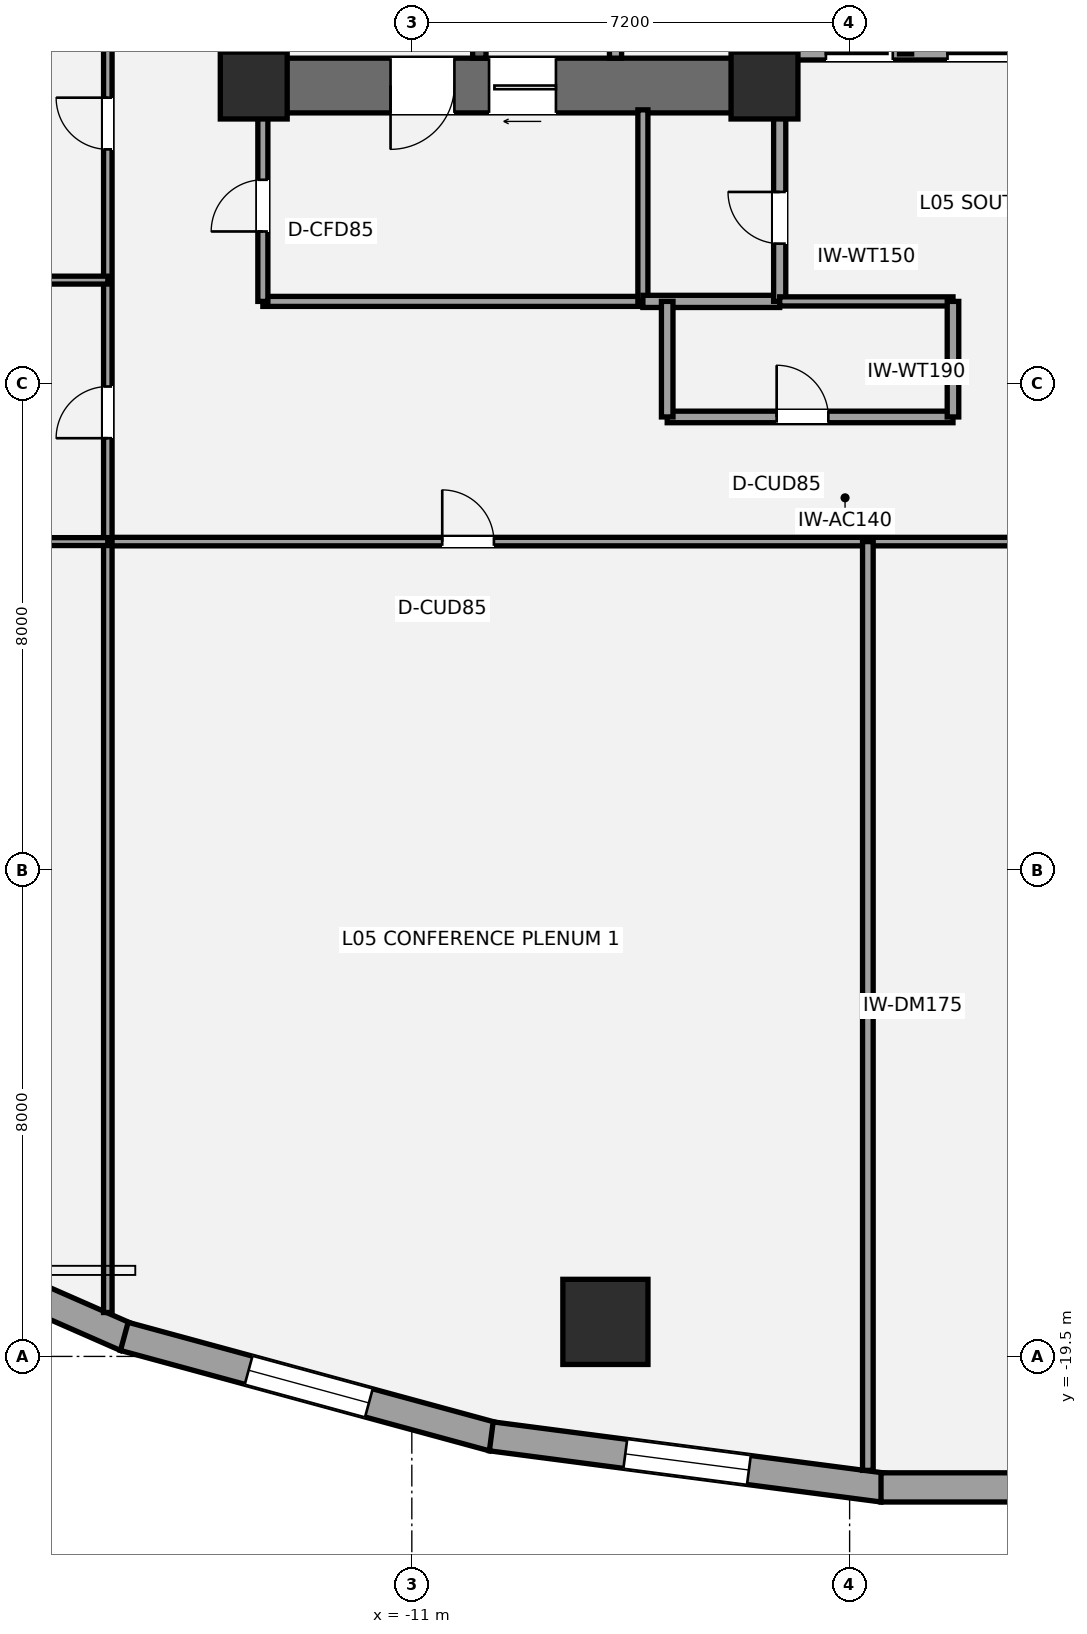
"""IFC4 building model, lengths in metres.
Left out: names, types, materials, properties, quantities, classifications, styles, units other than length and angle.
Written with IfcOpenShell. Run it as: python <this file> out.ifc"""

import sys

from ifc_helpers import new_model, si_unit, direction, frame, frame_2d, origin, origin_2d, place, context, subcontext, project, spatial, rectangle, hollow_circle, extrude, element, fill, save


model = new_model("IFC4")
c1 = context("Model", 3, precision=1e-05, world=origin(), true_north=direction((0.0, 1.0)))
c2 = subcontext(c1, "Body", "Model", "MODEL_VIEW")
j1 = project(units=[si_unit("LENGTHUNIT", "METRE"), si_unit("PLANEANGLEUNIT", "RADIAN")], contexts=[c1])
p1 = place(None, origin())
s1 = spatial("IfcSite", under=j1, at=p1, CompositionType="ELEMENT")
p2 = place(p1, origin())
s2 = spatial("IfcBuilding", under=s1, at=p2, CompositionType="ELEMENT")
p3 = place(p2, frame((0.0, 0.0, 22.8)))
s3 = spatial("IfcBuildingStorey", under=s2, at=p3, CompositionType="ELEMENT", Elevation=22.8)
p4 = place(p3, frame((-13.6, 0.95, 0.0), z_axis=(0.0, 0.0, 1.0), x_axis=(0.0, 1.0, 0.0)))
e1 = element("IfcWall", 1, at=p4, inside=s3, PredefinedType="SHEAR", context=c2, shape_type="SweptSolid", body=[
    extrude(rectangle(XDim=8.95, YDim=0.9, at=frame_2d((4.475, 0.0))), origin(), (0.0, 0.0, 1.0), 4.2),
])
p5 = place(p3, frame((-4.75, 1.4, 0.0), z_axis=(0.0, 0.0, 1.0), x_axis=(-1.0, 0.0, 0.0)))
e2 = element("IfcWall", 2, at=p5, inside=s3, PredefinedType="SHEAR", context=c2, shape_type="SweptSolid", body=[
    extrude(rectangle(XDim=9.3, YDim=0.9, at=frame_2d((4.65, 0.0))), origin(), (0.0, 0.0, 1.0), 4.2),
])
p6 = place(p5, frame((5.55, 0.0, 0.0)))
e3 = element("IfcOpeningElement", 3, at=p6, cuts=e2, PredefinedType="OPENING", context=c2, shape_type="SweptSolid", body=[
    extrude(rectangle(XDim=1.05, YDim=2.15, at=frame_2d((0.525, 1.075))), frame((0.0, 0.46, 0.0), z_axis=(0.0, -1.0, 0.0), x_axis=(1.0, 0.0, 0.0)), (0.0, 0.0, 1.0), 0.92),
])
p7 = place(p5, frame((3.88, 0.0, 0.0)))
e4 = element("IfcOpeningElement", 4, at=p7, cuts=e2, PredefinedType="OPENING", context=c2, shape_type="SweptSolid", body=[
    extrude(rectangle(XDim=1.1, YDim=2.2, at=frame_2d((0.55, 1.1))), frame((0.0, 0.46, 0.0), z_axis=(0.0, -1.0, 0.0), x_axis=(1.0, 0.0, 0.0)), (0.0, 0.0, 1.0), 0.92),
])
p8 = place(p3, frame((-5.2, 0.95, 0.0), z_axis=(0.0, 0.0, 1.0), x_axis=(0.0, 1.0, 0.0)))
e5 = element("IfcWall", 5, at=p8, inside=s3, PredefinedType="SHEAR", context=c2, shape_type="SweptSolid", body=[
    extrude(rectangle(XDim=2.85, YDim=0.9, at=frame_2d((1.425, 0.0))), origin(), (0.0, 0.0, 1.0), 4.2),
])
p9 = place(p3, frame((-9.89, 1.85, 0.0), z_axis=(0.0, 0.0, 1.0), x_axis=(0.0, 1.0, 0.0)))
e6 = element("IfcWall", 6, at=p9, inside=s3, PredefinedType="SHEAR", context=c2, shape_type="SweptSolid", body=[
    extrude(rectangle(XDim=7.15, YDim=0.22, at=frame_2d((3.575, 0.0))), origin(), (0.0, 0.0, 1.0), 4.2),
])
for number, where, z_axis, x_axis in (
    (7, (-13.6, 1.4, 0.0), (0.0, 0.0, 1.0), (1.0, 0.0, 0.0)),
    (8, (-5.2, 1.4, 0.0), (0.0, 0.0, 1.0), (1.0, 0.0, 0.0)),
):
    element("IfcColumn", number, at=place(p3, frame(where, z_axis=z_axis, x_axis=x_axis)), inside=s3, PredefinedType="COLUMN", context=c2, shape_type="SweptSolid", body=[
        extrude(rectangle(XDim=1.1, YDim=1.1, at=origin_2d()), origin(), (0.0, 0.0, 1.0), 4.2),
    ])
p10 = place(p3, frame((-7.816, -18.932, 0.0), z_axis=(0.0, 0.0, 1.0), x_axis=(1.0, 0.0, 0.0)))
e9 = element("IfcColumn", 9, at=p10, inside=s3, PredefinedType="USERDEFINED", context=c2, shape_type="SweptSolid", body=[
    extrude(hollow_circle(Radius=0.7, WallThickness=0.05, at=origin_2d()), origin(), (0.0, 0.0, 1.0), 4.13),
])
p11 = place(p3, frame((-15.695, -19.183, 0.0), z_axis=(0.0, 0.0, 1.0), x_axis=(-0.91570760638, 0.401845218484, 0.0)))
e10 = element("IfcWall", 10, at=p11, inside=s3, PredefinedType="STANDARD", context=c2, shape_type="SweptSolid", body=[
    extrude(rectangle(XDim=5.963, YDim=0.48, at=frame_2d((2.981, 0.0))), origin(), (0.0, 0.0, 1.0), 3.033),
])
p12 = place(p11, frame((1.957, 0.0, 0.72)))
e11 = element("IfcOpeningElement", 11, at=p12, cuts=e10, PredefinedType="OPENING", context=c2, shape_type="SweptSolid", body=[
    extrude(rectangle(XDim=2.05, YDim=1.8, at=frame_2d((1.025, 0.9))), frame((0.0, 0.25, 0.0), z_axis=(0.0, -1.0, 0.0), x_axis=(1.0, 0.0, 0.0)), (0.0, 0.0, 1.0), 0.5),
])
p13 = place(p3, frame((-9.662, -20.821, 0.0), z_axis=(0.0, 0.0, 1.0), x_axis=(-0.964936550718, 0.262483243445, 0.0)))
e12 = element("IfcWall", 12, at=p13, inside=s3, PredefinedType="STANDARD", context=c2, shape_type="SweptSolid", body=[
    extrude(rectangle(XDim=6.288, YDim=0.48, at=frame_2d((3.144, 0.0))), origin(), (0.0, 0.0, 1.0), 3.033),
])
p14 = place(p13, frame((2.119, 0.0, 0.72)))
e13 = element("IfcOpeningElement", 13, at=p14, cuts=e12, PredefinedType="OPENING", context=c2, shape_type="SweptSolid", body=[
    extrude(rectangle(XDim=2.05, YDim=1.8, at=frame_2d((1.025, 0.9))), frame((0.0, 0.25, 0.0), z_axis=(0.0, -1.0, 0.0), x_axis=(1.0, 0.0, 0.0)), (0.0, 0.0, 1.0), 0.5),
])
p15 = place(p3, frame((-3.252, -21.656, 0.0), z_axis=(0.0, 0.0, 1.0), x_axis=(-0.991576921472, 0.129519144545, 0.0)))
e14 = element("IfcWall", 14, at=p15, inside=s3, PredefinedType="STANDARD", context=c2, shape_type="SweptSolid", body=[
    extrude(rectangle(XDim=6.496, YDim=0.48, at=frame_2d((3.248, 0.0))), origin(), (0.0, 0.0, 1.0), 3.033),
])
p16 = place(p15, frame((2.223, 0.0, 0.72)))
e15 = element("IfcOpeningElement", 15, at=p16, cuts=e14, PredefinedType="OPENING", context=c2, shape_type="SweptSolid", body=[
    extrude(rectangle(XDim=2.05, YDim=1.8, at=frame_2d((1.025, 0.9))), frame((0.0, 0.25, 0.0), z_axis=(0.0, -1.0, 0.0), x_axis=(1.0, 0.0, 0.0)), (0.0, 0.0, 1.0), 0.5),
])
p17 = place(p3, frame((3.284, -21.654, 0.0), z_axis=(0.0, 0.0, 1.0), x_axis=(-1.0, 0.0, 0.0)))
e16 = element("IfcWall", 16, at=p17, inside=s3, PredefinedType="STANDARD", context=c2, shape_type="SweptSolid", body=[
    extrude(rectangle(XDim=6.567, YDim=0.48, at=frame_2d((3.284, 0.0))), origin(), (0.0, 0.0, 1.0), 3.033),
])
p18 = place(p17, frame((2.259, 0.0, 0.72)))
e17 = element("IfcOpeningElement", 17, at=p18, cuts=e16, PredefinedType="OPENING", context=c2, shape_type="SweptSolid", body=[
    extrude(rectangle(XDim=2.05, YDim=1.8, at=frame_2d((1.025, 0.9))), frame((0.0, 0.25, 0.0), z_axis=(0.0, -1.0, 0.0), x_axis=(1.0, 0.0, 0.0)), (0.0, 0.0, 1.0), 0.5),
])
p19 = place(p3, frame((-13.45, -2.15, 0.0), z_axis=(0.0, 0.0, 1.0), x_axis=(1.0, 0.0, 0.0)))
e18 = element("IfcWall", 18, at=p19, inside=s3, PredefinedType="PARTITIONING", context=c2, shape_type="SweptSolid", body=[
    extrude(rectangle(XDim=6.25, YDim=0.165, at=frame_2d((3.125, 0.0))), origin(), (0.0, 0.0, 1.0), 3.9),
])
p20 = place(p3, frame((-13.45, -2.15, 0.0), z_axis=(0.0, 0.0, 1.0), x_axis=(0.0, 1.0, 0.0)))
e19 = element("IfcWall", 19, at=p20, inside=s3, PredefinedType="PARTITIONING", context=c2, shape_type="SweptSolid", body=[
    extrude(rectangle(XDim=3.15, YDim=0.165, at=frame_2d((1.575, 0.0))), origin(), (0.0, 0.0, 1.0), 2.09),
])
p21 = place(p20, frame((1.15, 0.0, 0.0)))
e20 = element("IfcOpeningElement", 20, at=p21, cuts=e19, PredefinedType="OPENING", context=c2, shape_type="SweptSolid", body=[
    extrude(rectangle(XDim=0.85, YDim=2.0, at=frame_2d((0.425, 1.0))), frame((0.0, 0.093, 0.0), z_axis=(0.0, -1.0, 0.0), x_axis=(1.0, 0.0, 0.0)), (0.0, 0.0, 1.0), 0.185),
])
p22 = place(p3, frame((-7.2, -2.15, 0.0), z_axis=(0.0, 0.0, 1.0), x_axis=(0.0, 1.0, 0.0)))
e21 = element("IfcWall", 21, at=p22, inside=s3, PredefinedType="PARTITIONING", context=c2, shape_type="SweptSolid", body=[
    extrude(rectangle(XDim=3.15, YDim=0.165, at=frame_2d((1.575, 0.0))), origin(), (0.0, 0.0, 1.0), 3.9),
])
p23 = place(p3, frame((-7.2, -2.15, 0.0), z_axis=(0.0, 0.0, 1.0), x_axis=(1.0, 0.0, 0.0)))
e22 = element("IfcWall", 22, at=p23, inside=s3, PredefinedType="SOLIDWALL", context=c2, shape_type="SweptSolid", body=[
    extrude(rectangle(XDim=2.25, YDim=0.2, at=frame_2d((1.125, 0.0))), origin(), (0.0, 0.0, 1.0), 2.09),
])
p24 = place(p3, frame((-4.95, -2.15, 0.0), z_axis=(0.0, 0.0, 1.0), x_axis=(0.0, 1.0, 0.0)))
e23 = element("IfcWall", 23, at=p24, inside=s3, PredefinedType="SOLIDWALL", context=c2, shape_type="SweptSolid", body=[
    extrude(rectangle(XDim=3.15, YDim=0.2, at=frame_2d((1.575, 0.0))), origin(), (0.0, 0.0, 1.0), 2.09),
])
p25 = place(p24, frame((0.95, 0.0, 0.0)))
e24 = element("IfcOpeningElement", 24, at=p25, cuts=e23, PredefinedType="OPENING", context=c2, shape_type="SweptSolid", body=[
    extrude(rectangle(XDim=0.85, YDim=2.0, at=frame_2d((0.425, 1.0))), frame((0.0, 0.11, 0.0), z_axis=(0.0, -1.0, 0.0), x_axis=(1.0, 0.0, 0.0)), (0.0, 0.0, 1.0), 0.22),
])
p26 = place(p3, frame((-7.65, 1.85, 0.0), z_axis=(0.0, 0.0, 1.0), x_axis=(0.0, 1.0, 0.0)))
e25 = element("IfcWall", 25, at=p26, inside=s3, PredefinedType="SOLIDWALL", context=c2, shape_type="SweptSolid", body=[
    extrude(rectangle(XDim=1.93, YDim=0.2, at=frame_2d((0.965, 0.0))), origin(), (0.0, 0.0, 1.0), 3.9),
])
p27 = place(p3, frame((-4.74, 1.92, 0.0), z_axis=(0.0, 0.0, 1.0), x_axis=(1.0, 0.0, 0.0)))
e26 = element("IfcWall", 26, at=p27, inside=s3, PredefinedType="SOLIDWALL", context=c2, shape_type="SweptSolid", body=[
    extrude(rectangle(XDim=3.86, YDim=0.2, at=frame_2d((1.93, 0.0))), origin(), (0.0, 0.0, 1.0), 2.89),
])
p28 = place(p27, frame((0.55, 0.0, 0.0)))
e27 = element("IfcOpeningElement", 27, at=p28, cuts=e26, PredefinedType="OPENING", context=c2, shape_type="SweptSolid", body=[
    extrude(rectangle(XDim=1.1, YDim=2.2, at=frame_2d((0.55, 1.1))), frame((0.0, 0.11, 0.0), z_axis=(0.0, -1.0, 0.0), x_axis=(1.0, 0.0, 0.0)), (0.0, 0.0, 1.0), 0.22),
])
p29 = place(p27, frame((2.55, 0.0, 0.0)))
e28 = element("IfcOpeningElement", 28, at=p29, cuts=e26, PredefinedType="OPENING", context=c2, shape_type="SweptSolid", body=[
    extrude(rectangle(XDim=1.1, YDim=2.2, at=frame_2d((0.55, 1.1))), frame((0.0, 0.11, 0.0), z_axis=(0.0, -1.0, 0.0), x_axis=(1.0, 0.0, 0.0)), (0.0, 0.0, 1.0), 0.22),
])
p30 = place(p3, frame((-2.88, 1.92, 0.0), z_axis=(0.0, 0.0, 1.0), x_axis=(0.0, 1.0, 0.0)))
e29 = element("IfcWall", 29, at=p30, inside=s3, PredefinedType="SOLIDWALL", context=c2, shape_type="SweptSolid", body=[
    extrude(rectangle(XDim=1.82, YDim=0.2, at=frame_2d((0.91, 0.0))), origin(), (0.0, 0.0, 1.0), 3.9),
])
p31 = place(p3, frame((-6.8, -4.05, 0.0), z_axis=(0.0, 0.0, 1.0), x_axis=(1.0, 0.0, 0.0)))
e30 = element("IfcWall", 30, at=p31, inside=s3, PredefinedType="PLUMBINGWALL", context=c2, shape_type="SweptSolid", body=[
    extrude(rectangle(XDim=4.7, YDim=0.19, at=frame_2d((2.35, 0.0))), origin(), (0.0, 0.0, 1.0), 2.09),
])
p32 = place(p31, frame((1.8, 0.0, 0.0)))
e31 = element("IfcOpeningElement", 31, at=p32, cuts=e30, PredefinedType="OPENING", context=c2, shape_type="SweptSolid", body=[
    extrude(rectangle(XDim=0.85, YDim=2.0, at=frame_2d((0.425, 1.0))), frame((0.0, 0.105, 0.0), z_axis=(0.0, -1.0, 0.0), x_axis=(1.0, 0.0, 0.0)), (0.0, 0.0, 1.0), 0.21),
])
p33 = place(p3, frame((-4.95, -2.15, 0.0), z_axis=(0.0, 0.0, 1.0), x_axis=(1.0, 0.0, 0.0)))
e32 = element("IfcWall", 32, at=p33, inside=s3, PredefinedType="PLUMBINGWALL", context=c2, shape_type="SweptSolid", body=[
    extrude(rectangle(XDim=2.85, YDim=0.15, at=frame_2d((1.425, 0.0))), origin(), (0.0, 0.0, 1.0), 3.9),
])
for number, where, z_axis, x_axis in (
    (33, (-6.8, -4.05, 0.0), (0.0, 0.0, 1.0), (0.0, 1.0, 0.0)),
    (34, (-2.1, -4.05, 0.0), (0.0, 0.0, 1.0), (0.0, 1.0, 0.0)),
):
    element("IfcWall", number, at=place(p3, frame(where, z_axis=z_axis, x_axis=x_axis)), inside=s3, PredefinedType="PLUMBINGWALL", context=c2, shape_type="SweptSolid", body=[
        extrude(rectangle(XDim=1.9, YDim=0.19, at=frame_2d((0.95, 0.0))), origin(), (0.0, 0.0, 1.0), 3.9),
    ])
p34 = place(p3, frame((-16.0, -6.1, 0.0), z_axis=(0.0, 0.0, 1.0), x_axis=(1.0, 0.0, 0.0)))
e35 = element("IfcWall", 35, at=p34, inside=s3, PredefinedType="PARTITIONING", context=c2, shape_type="SweptSolid", body=[
    extrude(rectangle(XDim=34.4, YDim=0.14, at=frame_2d((17.2, 0.0))), origin(), (0.0, 0.0, 1.0), 2.09),
])
p35 = place(p34, frame((5.5, 0.0, 0.0)))
e36 = element("IfcOpeningElement", 36, at=p35, cuts=e35, PredefinedType="OPENING", context=c2, shape_type="SweptSolid", body=[
    extrude(rectangle(XDim=0.85, YDim=2.0, at=frame_2d((0.425, 1.0))), frame((0.0, 0.08, 0.0), z_axis=(0.0, -1.0, 0.0), x_axis=(1.0, 0.0, 0.0)), (0.0, 0.0, 1.0), 0.16),
])
p36 = place(p34, frame((17.9, 0.0, 0.0)))
e37 = element("IfcOpeningElement", 37, at=p36, cuts=e35, PredefinedType="OPENING", context=c2, shape_type="SweptSolid", body=[
    extrude(rectangle(XDim=0.85, YDim=2.0, at=frame_2d((0.425, 1.0))), frame((0.0, 0.08, 0.0), z_axis=(0.0, -1.0, 0.0), x_axis=(1.0, 0.0, 0.0)), (0.0, 0.0, 1.0), 0.16),
])
p37 = place(p34, frame((28.85, 0.0, 0.0)))
e38 = element("IfcOpeningElement", 38, at=p37, cuts=e35, PredefinedType="OPENING", context=c2, shape_type="SweptSolid", body=[
    extrude(rectangle(XDim=0.85, YDim=2.0, at=frame_2d((0.425, 1.0))), frame((0.0, 0.08, 0.0), z_axis=(0.0, -1.0, 0.0), x_axis=(1.0, 0.0, 0.0)), (0.0, 0.0, 1.0), 0.16),
])
p38 = place(p3, frame((-16.0, -18.778, 0.0), z_axis=(0.0, 0.0, 1.0), x_axis=(0.0, 1.0, 0.0)))
e39 = element("IfcWall", 39, at=p38, inside=s3, PredefinedType="PARTITIONING", context=c2, shape_type="SweptSolid", body=[
    extrude(rectangle(XDim=26.328, YDim=0.14, at=frame_2d((13.164, 0.0))), origin(), (0.0, 0.0, 1.0), 2.09),
])
p39 = place(p38, frame((14.378, 0.0, 0.0)))
e40 = element("IfcOpeningElement", 40, at=p39, cuts=e39, PredefinedType="OPENING", context=c2, shape_type="SweptSolid", body=[
    extrude(rectangle(XDim=0.85, YDim=2.0, at=frame_2d((0.425, 1.0))), frame((0.0, 0.08, 0.0), z_axis=(0.0, -1.0, 0.0), x_axis=(1.0, 0.0, 0.0)), (0.0, 0.0, 1.0), 0.16),
])
p40 = place(p38, frame((19.128, 0.0, 0.0)))
e41 = element("IfcOpeningElement", 41, at=p40, cuts=e39, PredefinedType="OPENING", context=c2, shape_type="SweptSolid", body=[
    extrude(rectangle(XDim=0.85, YDim=2.0, at=frame_2d((0.425, 1.0))), frame((0.0, 0.08, 0.0), z_axis=(0.0, -1.0, 0.0), x_axis=(1.0, 0.0, 0.0)), (0.0, 0.0, 1.0), 0.16),
])
p41 = place(p38, frame((23.803, 0.0, 0.0)))
e42 = element("IfcOpeningElement", 42, at=p41, cuts=e39, PredefinedType="OPENING", context=c2, shape_type="SweptSolid", body=[
    extrude(rectangle(XDim=0.85, YDim=2.0, at=frame_2d((0.425, 1.0))), frame((0.0, 0.08, 0.0), z_axis=(0.0, -1.0, 0.0), x_axis=(1.0, 0.0, 0.0)), (0.0, 0.0, 1.0), 0.16),
])
p42 = place(p3, frame((-3.5, -21.374, 0.0), z_axis=(0.0, 0.0, 1.0), x_axis=(0.0, 1.0, 0.0)))
e43 = element("IfcWall", 43, at=p42, inside=s3, PredefinedType="PARTITIONING", context=c2, shape_type="SweptSolid", body=[
    extrude(rectangle(XDim=15.274, YDim=0.175, at=frame_2d((7.637, 0.0))), origin(), (0.0, 0.0, 1.0), 2.09),
])
p43 = place(p3, frame((-31.634, -6.1, 0.0), z_axis=(0.0, 0.0, 1.0), x_axis=(1.0, 0.0, 0.0)))
e44 = element("IfcWall", 44, at=p43, inside=s3, PredefinedType="PARTITIONING", context=c2, shape_type="SweptSolid", body=[
    extrude(rectangle(XDim=15.634, YDim=0.13, at=frame_2d((7.817, 0.0))), origin(), (0.0, 0.0, 1.0), 2.09),
])
p44 = place(p43, frame((0.63, 0.0, 0.0)))
e45 = element("IfcOpeningElement", 45, at=p44, cuts=e44, PredefinedType="OPENING", context=c2, shape_type="SweptSolid", body=[
    extrude(rectangle(XDim=0.85, YDim=2.0, at=frame_2d((0.425, 1.0))), frame((0.0, 0.075, 0.0), z_axis=(0.0, -1.0, 0.0), x_axis=(1.0, 0.0, 0.0)), (0.0, 0.0, 1.0), 0.15),
])
p45 = place(p3, frame((-32.851, -1.8, 0.0), z_axis=(0.0, 0.0, 1.0), x_axis=(1.0, 0.0, 0.0)))
e46 = element("IfcWall", 46, at=p45, inside=s3, PredefinedType="PARTITIONING", context=c2, shape_type="SweptSolid", body=[
    extrude(rectangle(XDim=16.851, YDim=0.13, at=frame_2d((8.425, 0.0))), origin(), (0.0, 0.0, 1.0), 2.09),
])
p46 = place(p14, origin())
e47 = element("IfcWindow", 47, at=p46, inside=s3, PartitioningType="SINGLE_PANEL", PredefinedType="WINDOW", context=c2, shape_type="SweptSolid", body=[
    extrude(rectangle(XDim=2.05, YDim=1.8, at=frame_2d((1.025, 0.9))), frame((0.0, -0.01, 0.0), z_axis=(0.0, -1.0, 0.0), x_axis=(1.0, 0.0, 0.0)), (0.0, 0.0, 1.0), 0.06),
])
fill(e13, e47)
p47 = place(p16, origin())
e48 = element("IfcWindow", 48, at=p47, inside=s3, PartitioningType="SINGLE_PANEL", PredefinedType="WINDOW", context=c2, shape_type="SweptSolid", body=[
    extrude(rectangle(XDim=2.05, YDim=1.8, at=frame_2d((1.025, 0.9))), frame((0.0, -0.01, 0.0), z_axis=(0.0, -1.0, 0.0), x_axis=(1.0, 0.0, 0.0)), (0.0, 0.0, 1.0), 0.06),
])
fill(e15, e48)
p48 = place(p6, origin())
e49 = element("IfcDoor", 49, at=p48, inside=s3, OperationType="SINGLE_SWING_RIGHT", PredefinedType="DOOR", context=c2, shape_type="SweptSolid", body=[
    extrude(rectangle(XDim=1.05, YDim=2.15, at=frame_2d((0.525, 1.075))), frame((0.0, 0.025, 0.0), z_axis=(0.0, -1.0, 0.0), x_axis=(1.0, 0.0, 0.0)), (0.0, 0.0, 1.0), 0.05),
])
fill(e3, e49)
p49 = place(p21, origin())
e50 = element("IfcDoor", 50, at=p49, inside=s3, OperationType="SINGLE_SWING_LEFT", PredefinedType="DOOR", context=c2, shape_type="SweptSolid", body=[
    extrude(rectangle(XDim=0.85, YDim=2.0, at=frame_2d((0.425, 1.0))), frame((0.0, 0.025, 0.0), z_axis=(0.0, -1.0, 0.0), x_axis=(1.0, 0.0, 0.0)), (0.0, 0.0, 1.0), 0.05),
])
fill(e20, e50)
p50 = place(p25, origin())
e51 = element("IfcDoor", 51, at=p50, inside=s3, OperationType="SINGLE_SWING_RIGHT", PredefinedType="DOOR", context=c2, shape_type="SweptSolid", body=[
    extrude(rectangle(XDim=0.85, YDim=2.0, at=frame_2d((0.425, 1.0))), frame((0.0, 0.025, 0.0), z_axis=(0.0, -1.0, 0.0), x_axis=(1.0, 0.0, 0.0)), (0.0, 0.0, 1.0), 0.05),
])
fill(e24, e51)
p51 = place(p7, origin())
e52 = element("IfcDoor", 52, at=p51, inside=s3, OperationType="SLIDING_TO_LEFT", PredefinedType="DOOR", context=c2, shape_type="SweptSolid", body=[
    extrude(rectangle(XDim=1.1, YDim=2.2, at=frame_2d((0.55, 1.1))), frame((0.0, 0.025, 0.0), z_axis=(0.0, -1.0, 0.0), x_axis=(1.0, 0.0, 0.0)), (0.0, 0.0, 1.0), 0.05),
])
fill(e4, e52)
p52 = place(p28, origin())
e53 = element("IfcDoor", 53, at=p52, inside=s3, OperationType="SLIDING_TO_LEFT", PredefinedType="DOOR", context=c2, shape_type="SweptSolid", body=[
    extrude(rectangle(XDim=1.1, YDim=2.2, at=frame_2d((0.55, 1.1))), frame((0.0, 0.025, 0.0), z_axis=(0.0, -1.0, 0.0), x_axis=(1.0, 0.0, 0.0)), (0.0, 0.0, 1.0), 0.05),
])
fill(e27, e53)
p53 = place(p29, origin())
e54 = element("IfcDoor", 54, at=p53, inside=s3, OperationType="SLIDING_TO_LEFT", PredefinedType="DOOR", context=c2, shape_type="SweptSolid", body=[
    extrude(rectangle(XDim=1.1, YDim=2.2, at=frame_2d((0.55, 1.1))), frame((0.0, 0.025, 0.0), z_axis=(0.0, -1.0, 0.0), x_axis=(1.0, 0.0, 0.0)), (0.0, 0.0, 1.0), 0.05),
])
fill(e28, e54)
p54 = place(p32, origin())
e55 = element("IfcDoor", 55, at=p54, inside=s3, OperationType="SINGLE_SWING_LEFT", PredefinedType="DOOR", context=c2, shape_type="SweptSolid", body=[
    extrude(rectangle(XDim=0.85, YDim=2.0, at=frame_2d((0.425, 1.0))), frame((0.0, 0.025, 0.0), z_axis=(0.0, -1.0, 0.0), x_axis=(1.0, 0.0, 0.0)), (0.0, 0.0, 1.0), 0.05),
])
fill(e31, e55)
p55 = place(p35, origin())
e56 = element("IfcDoor", 56, at=p55, inside=s3, OperationType="SINGLE_SWING_LEFT", PredefinedType="DOOR", context=c2, shape_type="SweptSolid", body=[
    extrude(rectangle(XDim=0.85, YDim=2.0, at=frame_2d((0.425, 1.0))), frame((0.0, 0.025, 0.0), z_axis=(0.0, -1.0, 0.0), x_axis=(1.0, 0.0, 0.0)), (0.0, 0.0, 1.0), 0.05),
])
fill(e36, e56)
p56 = place(p39, origin())
e57 = element("IfcDoor", 57, at=p56, inside=s3, OperationType="SINGLE_SWING_LEFT", PredefinedType="DOOR", context=c2, shape_type="SweptSolid", body=[
    extrude(rectangle(XDim=0.85, YDim=2.0, at=frame_2d((0.425, 1.0))), frame((0.0, 0.025, 0.0), z_axis=(0.0, -1.0, 0.0), x_axis=(1.0, 0.0, 0.0)), (0.0, 0.0, 1.0), 0.05),
])
fill(e40, e57)
p57 = place(p40, origin())
e58 = element("IfcDoor", 58, at=p57, inside=s3, OperationType="SINGLE_SWING_RIGHT", PredefinedType="DOOR", context=c2, shape_type="SweptSolid", body=[
    extrude(rectangle(XDim=0.85, YDim=2.0, at=frame_2d((0.425, 1.0))), frame((0.0, 0.025, 0.0), z_axis=(0.0, -1.0, 0.0), x_axis=(1.0, 0.0, 0.0)), (0.0, 0.0, 1.0), 0.05),
])
fill(e41, e58)
save(model, sys.argv[1])
